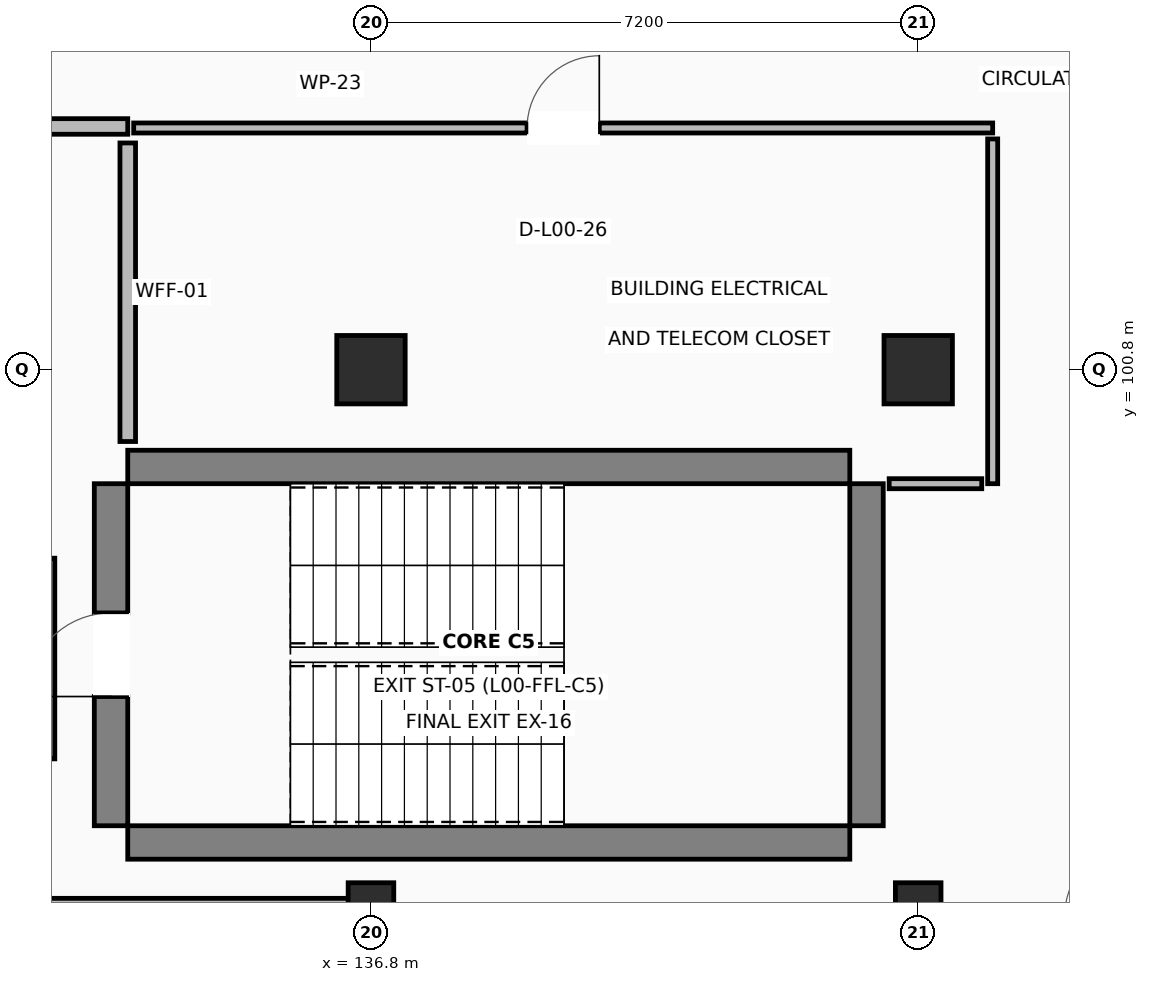
"""IFC4 building model, lengths in metres.
Left out: names, types, materials, properties, quantities, classifications, styles, units other than length and angle.
Written with IfcOpenShell. Run it as: python <this file> out.ifc"""

import sys

from ifc_helpers import new_model, si_unit, direction, frame, frame_2d, origin, origin_2d, place, context, subcontext, project, spatial, rectangle, extrude, element, fill, save


model = new_model("IFC4")
c1 = context("Model", 3, precision=1e-05, world=origin(), true_north=direction((0.0, 1.0)))
c2 = subcontext(c1, "Body", "Model", "MODEL_VIEW")
j1 = project(units=[si_unit("LENGTHUNIT", "METRE"), si_unit("PLANEANGLEUNIT", "RADIAN")], contexts=[c1])
p1 = place(None, origin())
s1 = spatial("IfcSite", under=j1, at=p1, CompositionType="ELEMENT")
p2 = place(p1, origin())
s2 = spatial("IfcBuilding", under=s1, at=p2, CompositionType="ELEMENT")
p3 = place(p2, origin())
s3 = spatial("IfcBuildingStorey", under=s2, at=p3, CompositionType="ELEMENT", Elevation=0.0)
p4 = place(p3, frame((136.8, 93.6, 0.0), z_axis=(0.0, 0.0, 1.0), x_axis=(1.0, 0.0, 0.0)))
e1 = element("IfcColumn", 1, at=p4, inside=s3, PredefinedType="COLUMN", context=c2, shape_type="SweptSolid", body=[
    extrude(rectangle(XDim=0.6, YDim=0.9, at=origin_2d()), origin(), (0.0, 0.0, 1.0), 4.22),
])
p5 = place(p3, frame((136.8, 100.8, 0.0), z_axis=(0.0, 0.0, 1.0), x_axis=(1.0, 0.0, 0.0)))
e2 = element("IfcColumn", 2, at=p5, inside=s3, PredefinedType="COLUMN", context=c2, shape_type="SweptSolid", body=[
    extrude(rectangle(XDim=0.9, YDim=0.9, at=origin_2d()), origin(), (0.0, 0.0, 1.0), 4.22),
])
p6 = place(p3, frame((144.0, 93.6, 0.0), z_axis=(0.0, 0.0, 1.0), x_axis=(1.0, 0.0, 0.0)))
e3 = element("IfcColumn", 3, at=p6, inside=s3, PredefinedType="COLUMN", context=c2, shape_type="SweptSolid", body=[
    extrude(rectangle(XDim=0.6, YDim=0.9, at=origin_2d()), origin(), (0.0, 0.0, 1.0), 4.22),
])
p7 = place(p3, frame((144.0, 100.8, 0.0), z_axis=(0.0, 0.0, 1.0), x_axis=(1.0, 0.0, 0.0)))
e4 = element("IfcColumn", 4, at=p7, inside=s3, PredefinedType="COLUMN", context=c2, shape_type="SweptSolid", body=[
    extrude(rectangle(XDim=0.9, YDim=0.9, at=origin_2d()), origin(), (0.0, 0.0, 1.0), 4.22),
])
for number, where, z_axis, x_axis in (
    (5, (133.6, 94.58, 0.0), (0.0, 0.0, 1.0), (1.0, 0.0, 0.0)),
    (6, (133.6, 99.52, 0.0), (0.0, 0.0, 1.0), (1.0, 0.0, 0.0)),
):
    element("IfcWall", number, at=place(p3, frame(where, z_axis=z_axis, x_axis=x_axis)), inside=s3, PredefinedType="SHEAR", context=c2, shape_type="SweptSolid", body=[
        extrude(rectangle(XDim=9.5, YDim=0.44, at=frame_2d((4.75, 0.0))), origin(), (0.0, 0.0, 1.0), 4.22),
    ])
p8 = place(p3, frame((133.38, 94.8, 0.0), z_axis=(0.0, 0.0, 1.0), x_axis=(0.0, 1.0, 0.0)))
e7 = element("IfcWall", 7, at=p8, inside=s3, PredefinedType="SHEAR", context=c2, shape_type="SweptSolid", body=[
    extrude(rectangle(XDim=4.5, YDim=0.44, at=frame_2d((2.25, 0.0))), origin(), (0.0, 0.0, 1.0), 4.22),
])
p9 = place(p8, frame((1.7, 0.0, 0.0)))
e8 = element("IfcOpeningElement", 8, at=p9, cuts=e7, PredefinedType="OPENING", context=c2, shape_type="SweptSolid", body=[
    extrude(rectangle(XDim=1.1, YDim=2.15, at=frame_2d((0.55, 1.075))), frame((0.0, 0.23, 0.0), z_axis=(0.0, -1.0, 0.0), x_axis=(1.0, 0.0, 0.0)), (0.0, 0.0, 1.0), 0.46),
])
p10 = place(p3, frame((143.32, 94.8, 0.0), z_axis=(0.0, 0.0, 1.0), x_axis=(0.0, 1.0, 0.0)))
e9 = element("IfcWall", 9, at=p10, inside=s3, PredefinedType="SHEAR", context=c2, shape_type="SweptSolid", body=[
    extrude(rectangle(XDim=4.5, YDim=0.44, at=frame_2d((2.25, 0.0))), origin(), (0.0, 0.0, 1.0), 4.22),
])
p11 = place(p3, frame((136.8, 93.722, 0.0), z_axis=(0.0, 0.0, 1.0), x_axis=(-1.0, 0.0, 0.0)))
e10 = element("IfcWall", 10, at=p11, inside=s3, PredefinedType="STANDARD", context=c2, shape_type="SweptSolid", body=[
    extrude(rectangle(XDim=7.2, YDim=0.245, at=frame_2d((3.6, 0.0))), origin(), (0.0, 0.0, 1.0), 2.6),
])
p12 = place(p11, frame((4.25, 0.0, 0.0)))
e11 = element("IfcOpeningElement", 11, at=p12, cuts=e10, PredefinedType="OPENING", context=c2, shape_type="SweptSolid", body=[
    extrude(rectangle(XDim=2.1, YDim=2.3, at=frame_2d((1.05, 1.15))), frame((0.0, 0.133, 0.0), z_axis=(0.0, -1.0, 0.0), x_axis=(1.0, 0.0, 0.0)), (0.0, 0.0, 1.0), 0.265),
])
p13 = place(p3, frame((136.942, 93.845, 0.0), z_axis=(0.0, 0.0, 1.0), x_axis=(0.0, -1.0, 0.0)))
e12 = element("IfcWall", 12, at=p13, inside=s3, PredefinedType="STANDARD", context=c2, shape_type="SweptSolid", body=[
    extrude(rectangle(XDim=1.033, YDim=0.285, at=frame_2d((0.517, 0.0))), origin(), (0.0, 0.0, 1.0), 2.6),
])
p14 = place(p3, frame((132.53, 95.68, 0.0), z_axis=(0.0, 0.0, 1.0), x_axis=(0.0, 1.0, 0.0)))
e13 = element("IfcWall", 13, at=p14, inside=s3, PredefinedType="STANDARD", context=c2, shape_type="SweptSolid", body=[
    extrude(rectangle(XDim=2.64, YDim=0.22, at=frame_2d((1.32, 0.0))), origin(), (0.0, 0.0, 1.0), 2.6),
])
p15 = place(p3, frame((129.4, 104.0, 0.0), z_axis=(0.0, 0.0, 1.0), x_axis=(1.0, 0.0, 0.0)))
e14 = element("IfcWall", 14, at=p15, inside=s3, PredefinedType="PARTITIONING", context=c2, shape_type="SweptSolid", body=[
    extrude(rectangle(XDim=4.2, YDim=0.205, at=frame_2d((2.1, 0.0))), origin(), (0.0, 0.0, 1.0), 2.6),
])
p16 = place(p15, frame((1.5, 0.0, 0.0)))
e15 = element("IfcOpeningElement", 15, at=p16, cuts=e14, PredefinedType="OPENING", context=c2, shape_type="SweptSolid", body=[
    extrude(rectangle(XDim=1.2, YDim=2.15, at=frame_2d((0.6, 1.075))), frame((0.0, 0.113, 0.0), z_axis=(0.0, -1.0, 0.0), x_axis=(1.0, 0.0, 0.0)), (0.0, 0.0, 1.0), 0.225),
])
p17 = place(p3, frame((133.6, 103.783, 0.0), z_axis=(0.0, 0.0, 1.0), x_axis=(0.0, -1.0, 0.0)))
e16 = element("IfcWall", 16, at=p17, inside=s3, PredefinedType="PARTITIONING", context=c2, shape_type="SweptSolid", body=[
    extrude(rectangle(XDim=3.928, YDim=0.205, at=frame_2d((1.964, 0.0))), origin(), (0.0, 0.0, 1.0), 2.6),
])
p18 = place(p3, frame((133.678, 103.98, 0.0), z_axis=(0.0, 0.0, 1.0), x_axis=(1.0, 0.0, 0.0)))
e17 = element("IfcWall", 17, at=p18, inside=s3, PredefinedType="PARTITIONING", context=c2, shape_type="SweptSolid", body=[
    extrude(rectangle(XDim=11.302, YDim=0.132, at=frame_2d((5.651, 0.0))), origin(), (0.0, 0.0, 1.0), 2.6),
])
p19 = place(p18, frame((5.176, 0.0, 0.0)))
e18 = element("IfcOpeningElement", 18, at=p19, cuts=e17, PredefinedType="OPENING", context=c2, shape_type="SweptSolid", body=[
    extrude(rectangle(XDim=0.95, YDim=2.1, at=frame_2d((0.475, 1.05))), frame((0.0, 0.076, 0.0), z_axis=(0.0, -1.0, 0.0), x_axis=(1.0, 0.0, 0.0)), (0.0, 0.0, 1.0), 0.152),
])
p20 = place(p3, frame((144.98, 103.836, 0.0), z_axis=(0.0, 0.0, 1.0), x_axis=(0.0, -1.0, 0.0)))
e19 = element("IfcWall", 19, at=p20, inside=s3, PredefinedType="PARTITIONING", context=c2, shape_type="SweptSolid", body=[
    extrude(rectangle(XDim=4.536, YDim=0.132, at=frame_2d((2.268, 0.0))), origin(), (0.0, 0.0, 1.0), 2.6),
])
p21 = place(p3, frame((144.836, 99.3, 0.0), z_axis=(0.0, 0.0, 1.0), x_axis=(-1.0, 0.0, 0.0)))
e20 = element("IfcWall", 20, at=p21, inside=s3, PredefinedType="PARTITIONING", context=c2, shape_type="SweptSolid", body=[
    extrude(rectangle(XDim=1.218, YDim=0.132, at=frame_2d((0.609, 0.0))), origin(), (0.0, 0.0, 1.0), 2.6),
])
p22 = place(p9, origin())
e21 = element("IfcDoor", 21, at=p22, inside=s3, OperationType="SINGLE_SWING_LEFT", PredefinedType="DOOR", context=c2, shape_type="SweptSolid", body=[
    extrude(rectangle(XDim=1.1, YDim=2.15, at=frame_2d((0.55, 1.075))), frame((0.0, 0.025, 0.0), z_axis=(0.0, -1.0, 0.0), x_axis=(1.0, 0.0, 0.0)), (0.0, 0.0, 1.0), 0.05),
])
fill(e8, e21)
p23 = place(p19, origin())
e22 = element("IfcDoor", 22, at=p23, inside=s3, OperationType="SINGLE_SWING_RIGHT", PredefinedType="DOOR", context=c2, shape_type="SweptSolid", body=[
    extrude(rectangle(XDim=0.95, YDim=2.1, at=frame_2d((0.475, 1.05))), frame((0.0, 0.025, 0.0), z_axis=(0.0, -1.0, 0.0), x_axis=(1.0, 0.0, 0.0)), (0.0, 0.0, 1.0), 0.05),
])
fill(e18, e22)
save(model, sys.argv[1])
